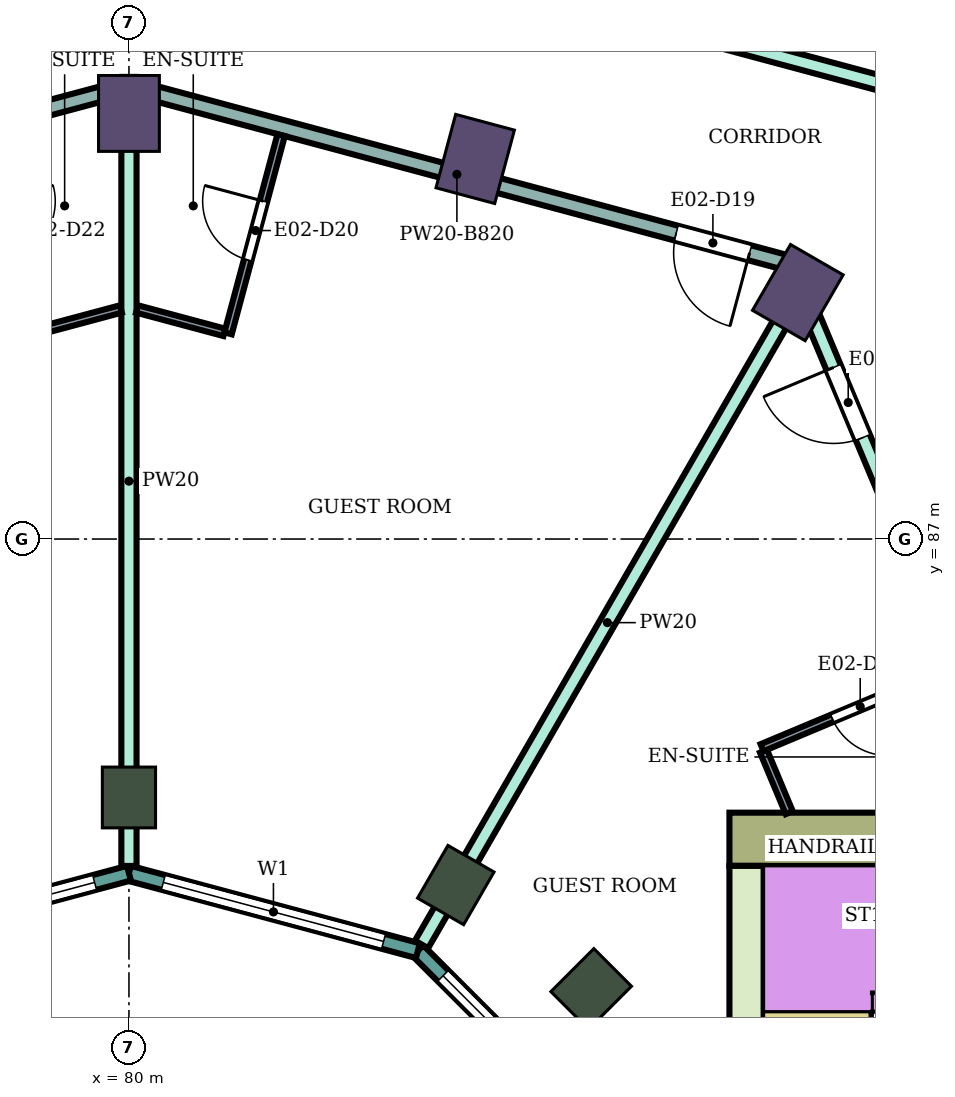
"""IFC4 building model, lengths in metres.
Left out: names, types, materials, properties, quantities, classifications, styles, units other than length and angle.
Written with IfcOpenShell. Run it as: python <this file> out.ifc"""

import sys

from ifc_helpers import new_model, si_unit, direction, frame, frame_2d, origin, origin_2d, place, context, subcontext, project, spatial, rectangle, extrude, element, fill, save


model = new_model("IFC4")
c1 = context("Model", 3, precision=1e-05, world=origin(), true_north=direction((0.0, 1.0)))
c2 = subcontext(c1, "Body", "Model", "MODEL_VIEW")
j1 = project(units=[si_unit("LENGTHUNIT", "METRE"), si_unit("PLANEANGLEUNIT", "RADIAN")], contexts=[c1])
p1 = place(None, origin())
s1 = spatial("IfcSite", under=j1, at=p1, CompositionType="ELEMENT")
p2 = place(p1, origin())
s2 = spatial("IfcBuilding", under=s1, at=p2, CompositionType="ELEMENT")
p3 = place(p2, frame((0.0, 0.0, 130.2)))
s3 = spatial("IfcBuildingStorey", under=s2, at=p3, CompositionType="ELEMENT", Elevation=130.2)
for number, where, z_axis, x_axis in (
    (1, (88.8, 90.242, 0.0), (0.0, 0.0, 1.0), (0.5, 0.866, 0.0)),
    (2, (84.555, 92.0, 0.0), (0.0, 0.0, 1.0), (0.259, 0.966, 0.0)),
    (3, (80.0, 92.6, 0.0), (0.0, 0.0, 1.0), (0.0, 1.0, 0.0)),
):
    element("IfcColumn", number, at=place(p3, frame(where, z_axis=z_axis, x_axis=x_axis)), inside=s3, PredefinedType="COLUMN", context=c2, shape_type="SweptSolid", body=[
        extrude(rectangle(XDim=1.0, YDim=0.8, at=origin_2d()), origin(), (0.0, 0.0, 1.0), 3.9),
    ])
for number, where, z_axis, x_axis in (
    (4, (86.081, 81.081, 0.0), (0.0, 0.0, 1.0), (0.707, 0.707, 0.0)),
    (5, (84.3, 82.448, 0.0), (0.0, 0.0, 1.0), (0.5, 0.866, 0.0)),
    (6, (80.0, 83.6, 0.0), (0.0, 0.0, 1.0), (0.0, 1.0, 0.0)),
):
    element("IfcColumn", number, at=place(p3, frame(where, z_axis=z_axis, x_axis=x_axis)), inside=s3, PredefinedType="COLUMN", context=c2, shape_type="SweptSolid", body=[
        extrude(rectangle(XDim=0.8, YDim=0.7, at=origin_2d()), origin(), (0.0, 0.0, 1.0), 3.9),
    ])
p4 = place(p3, frame((87.9, 83.05, 0.0), z_axis=(0.0, 0.0, 1.0), x_axis=(1.0, 0.0, 0.0)))
e7 = element("IfcWall", 7, at=p4, inside=s3, PredefinedType="SHEAR", context=c2, shape_type="SweptSolid", body=[
    extrude(rectangle(XDim=14.8, YDim=0.7, at=frame_2d((7.4, 0.0))), origin(), (0.0, 0.0, 1.0), 3.58),
])
p5 = place(p4, frame((4.2, 0.0, 0.0)))
e8 = element("IfcOpeningElement", 8, at=p5, cuts=e7, PredefinedType="OPENING", context=c2, shape_type="SweptSolid", body=[
    extrude(rectangle(XDim=2.4, YDim=2.4, at=frame_2d((1.2, 1.2))), frame((0.0, 0.36, 0.0), z_axis=(0.0, -1.0, 0.0), x_axis=(1.0, 0.0, 0.0)), (0.0, 0.0, 1.0), 0.72),
])
p6 = place(p3, frame((88.125, 75.0, 0.0), z_axis=(0.0, 0.0, 1.0), x_axis=(0.0, 1.0, 0.0)))
e9 = element("IfcWall", 9, at=p6, inside=s3, PredefinedType="SHEAR", context=c2, shape_type="SweptSolid", body=[
    extrude(rectangle(XDim=7.7, YDim=0.45, at=frame_2d((3.85, 0.0))), origin(), (0.0, 0.0, 1.0), 3.58),
])
p7 = place(p3, frame((86.585, 78.802, 0.0), z_axis=(0.0, 0.0, 1.0), x_axis=(-0.707106781187, 0.707106781187, 0.0)))
e10 = element("IfcWall", 10, at=p7, inside=s3, PredefinedType="NOTDEFINED", context=c2, shape_type="SweptSolid", body=[
    extrude(rectangle(XDim=3.936, YDim=0.2, at=frame_2d((1.968, 0.0))), origin(), (0.0, 0.0, 1.0), 3.9),
])
p8 = place(p7, frame((0.468, 0.0, 0.9)))
e11 = element("IfcOpeningElement", 11, at=p8, cuts=e10, PredefinedType="OPENING", context=c2, shape_type="SweptSolid", body=[
    extrude(rectangle(XDim=3.0, YDim=2.3, at=frame_2d((1.5, 1.15))), frame((0.0, 0.11, 0.0), z_axis=(0.0, -1.0, 0.0), x_axis=(1.0, 0.0, 0.0)), (0.0, 0.0, 1.0), 0.22),
])
p9 = place(p3, frame((83.802, 81.585, 0.0), z_axis=(0.0, 0.0, 1.0), x_axis=(-0.965933654434, 0.258789828301, 0.0)))
e12 = element("IfcWall", 12, at=p9, inside=s3, PredefinedType="NOTDEFINED", context=c2, shape_type="SweptSolid", body=[
    extrude(rectangle(XDim=3.936, YDim=0.2, at=frame_2d((1.968, 0.0))), origin(), (0.0, 0.0, 1.0), 3.9),
])
p10 = place(p9, frame((0.468, 0.0, 0.9)))
e13 = element("IfcOpeningElement", 13, at=p10, cuts=e12, PredefinedType="OPENING", context=c2, shape_type="SweptSolid", body=[
    extrude(rectangle(XDim=3.0, YDim=2.3, at=frame_2d((1.5, 1.15))), frame((0.0, 0.11, 0.0), z_axis=(0.0, -1.0, 0.0), x_axis=(1.0, 0.0, 0.0)), (0.0, 0.0, 1.0), 0.22),
])
p11 = place(p3, frame((80.0, 82.604, 0.0), z_axis=(0.0, 0.0, 1.0), x_axis=(-0.965933654434, -0.258789828301, 0.0)))
e14 = element("IfcWall", 14, at=p11, inside=s3, PredefinedType="NOTDEFINED", context=c2, shape_type="SweptSolid", body=[
    extrude(rectangle(XDim=3.936, YDim=0.2, at=frame_2d((1.968, 0.0))), origin(), (0.0, 0.0, 1.0), 3.9),
])
p12 = place(p11, frame((0.468, 0.0, 0.9)))
e15 = element("IfcOpeningElement", 15, at=p12, cuts=e14, PredefinedType="OPENING", context=c2, shape_type="SweptSolid", body=[
    extrude(rectangle(XDim=3.0, YDim=2.3, at=frame_2d((1.5, 1.15))), frame((0.0, 0.11, 0.0), z_axis=(0.0, -1.0, 0.0), x_axis=(1.0, 0.0, 0.0)), (0.0, 0.0, 1.0), 0.22),
])
p13 = place(p3, frame((69.397, 92.805, 0.0), z_axis=(0.0, 0.0, 1.0), x_axis=(0.965971666602, 0.258647906087, 0.0)))
e16 = element("IfcWall", 16, at=p13, inside=s3, PredefinedType="PARTITIONING", context=c2, shape_type="SweptSolid", body=[
    extrude(rectangle(XDim=10.887, YDim=0.2, at=frame_2d((5.443, 0.0))), origin(), (0.0, 0.0, 1.0), 3.45),
])
p14 = place(p13, frame((6.163, 0.0, 0.0)))
e17 = element("IfcOpeningElement", 17, at=p14, cuts=e16, PredefinedType="OPENING", context=c2, shape_type="SweptSolid", body=[
    extrude(rectangle(XDim=1.0, YDim=2.1, at=frame_2d((0.5, 1.05))), frame((0.0, 0.11, 0.0), z_axis=(0.0, -1.0, 0.0), x_axis=(1.0, 0.0, 0.0)), (0.0, 0.0, 1.0), 0.22),
])
p15 = place(p13, frame((2.461, 0.0, 0.0)))
e18 = element("IfcOpeningElement", 18, at=p15, cuts=e16, PredefinedType="OPENING", context=c2, shape_type="SweptSolid", body=[
    extrude(rectangle(XDim=1.0, YDim=2.1, at=frame_2d((0.5, 1.05))), frame((0.0, 0.11, 0.0), z_axis=(0.0, -1.0, 0.0), x_axis=(1.0, 0.0, 0.0)), (0.0, 0.0, 1.0), 0.22),
])
p16 = place(p3, frame((71.303, 90.625, 0.0), z_axis=(0.0, 0.0, 1.0), x_axis=(0.965971868307, 0.258647152776, 0.0)))
e19 = element("IfcWall", 19, at=p16, inside=s3, PredefinedType="PARTITIONING", context=c2, shape_type="SweptSolid", body=[
    extrude(rectangle(XDim=8.874, YDim=0.2, at=frame_2d((4.437, 0.0))), origin(), (0.0, 0.0, 1.0), 3.08),
])
p17 = place(p16, frame((0.55, 0.0, 0.0)))
e20 = element("IfcOpeningElement", 20, at=p17, cuts=e19, PredefinedType="OPENING", context=c2, shape_type="SweptSolid", body=[
    extrude(rectangle(XDim=1.0, YDim=2.1, at=frame_2d((0.5, 1.05))), frame((0.0, 0.11, 0.0), z_axis=(0.0, -1.0, 0.0), x_axis=(1.0, 0.0, 0.0)), (0.0, 0.0, 1.0), 0.22),
])
p18 = place(p3, frame((80.0, 82.699, 0.0), z_axis=(0.0, 0.0, 1.0), x_axis=(0.0, 1.0, 0.0)))
e21 = element("IfcWall", 21, at=p18, inside=s3, PredefinedType="PARTITIONING", context=c2, shape_type="SweptSolid", body=[
    extrude(rectangle(XDim=10.125, YDim=0.2, at=frame_2d((5.062, 0.0))), origin(), (0.0, 0.0, 1.0), 3.45),
])
p19 = place(p3, frame((80.0, 92.954, 0.0), z_axis=(0.0, 0.0, 1.0), x_axis=(0.96592536278, -0.258820774936, 0.0)))
e22 = element("IfcWall", 22, at=p19, inside=s3, PredefinedType="PARTITIONING", context=c2, shape_type="SweptSolid", body=[
    extrude(rectangle(XDim=8.934, YDim=0.2, at=frame_2d((4.467, 0.0))), origin(), (0.0, 0.0, 1.0), 3.08),
])
p20 = place(p19, frame((7.454, 0.0, 0.0)))
e23 = element("IfcOpeningElement", 23, at=p20, cuts=e22, PredefinedType="OPENING", context=c2, shape_type="SweptSolid", body=[
    extrude(rectangle(XDim=1.0, YDim=2.1, at=frame_2d((0.5, 1.05))), frame((0.0, 0.11, 0.0), z_axis=(0.0, -1.0, 0.0), x_axis=(1.0, 0.0, 0.0)), (0.0, 0.0, 1.0), 0.22),
])
p21 = place(p3, frame((80.0, 95.648, 0.0), z_axis=(0.0, 0.0, 1.0), x_axis=(0.965852259202, -0.259093445292, 0.0)))
e24 = element("IfcWall", 24, at=p21, inside=s3, PredefinedType="PARTITIONING", context=c2, shape_type="SweptSolid", body=[
    extrude(rectangle(XDim=10.597, YDim=0.2, at=frame_2d((5.298, 0.0))), origin(), (0.0, 0.0, 1.0), 3.45),
])
p22 = place(p21, frame((1.0, 0.0, 0.0)))
e25 = element("IfcOpeningElement", 25, at=p22, cuts=e24, PredefinedType="OPENING", context=c2, shape_type="SweptSolid", body=[
    extrude(rectangle(XDim=1.0, YDim=2.1, at=frame_2d((0.5, 1.05))), frame((0.0, 0.11, 0.0), z_axis=(0.0, -1.0, 0.0), x_axis=(1.0, 0.0, 0.0)), (0.0, 0.0, 1.0), 0.22),
])
p23 = place(p3, frame((83.85, 81.667, 0.0), z_axis=(0.0, 0.0, 1.0), x_axis=(0.500092047414, 0.865972253663, 0.0)))
e26 = element("IfcWall", 26, at=p23, inside=s3, PredefinedType="PARTITIONING", context=c2, shape_type="SweptSolid", body=[
    extrude(rectangle(XDim=9.778, YDim=0.2, at=frame_2d((4.889, 0.0))), origin(), (0.0, 0.0, 1.0), 3.45),
])
p24 = place(p3, frame((88.698, 90.624, 0.0), z_axis=(0.0, 0.0, 1.0), x_axis=(0.386027055918, -0.922487459047, 0.0)))
e27 = element("IfcWall", 27, at=p24, inside=s3, PredefinedType="PARTITIONING", context=c2, shape_type="SweptSolid", body=[
    extrude(rectangle(XDim=7.832, YDim=0.2, at=frame_2d((3.916, 0.0))), origin(), (0.0, 0.0, 1.0), 3.45),
])
p25 = place(p24, frame((1.482, 0.0, 0.0)))
e28 = element("IfcOpeningElement", 28, at=p25, cuts=e27, PredefinedType="OPENING", context=c2, shape_type="SweptSolid", body=[
    extrude(rectangle(XDim=1.0, YDim=2.1, at=frame_2d((0.5, 1.05))), frame((0.0, 0.11, 0.0), z_axis=(0.0, -1.0, 0.0), x_axis=(1.0, 0.0, 0.0)), (0.0, 0.0, 1.0), 0.22),
])
p26 = place(p3, frame((78.696, 89.706, 0.0), z_axis=(0.0, 0.0, 1.0), x_axis=(0.966002513606, 0.258532674351, 0.0)))
e29 = element("IfcWall", 29, at=p26, inside=s3, PredefinedType="PARTITIONING", context=c2, shape_type="SweptSolid", body=[
    extrude(rectangle(XDim=1.24, YDim=0.1, at=frame_2d((0.62, 0.0))), origin(), (0.0, 0.0, 1.0), 3.45),
])
p27 = place(p3, frame((80.106, 90.027, 0.0), z_axis=(0.0, 0.0, 1.0), x_axis=(0.966002973184, -0.258530957139, 0.0)))
e30 = element("IfcWall", 30, at=p27, inside=s3, PredefinedType="PARTITIONING", context=c2, shape_type="SweptSolid", body=[
    extrude(rectangle(XDim=1.19, YDim=0.1, at=frame_2d((0.595, 0.0))), origin(), (0.0, 0.0, 1.0), 3.45),
])
p28 = place(p3, frame((81.304, 89.706, 0.0), z_axis=(0.0, 0.0, 1.0), x_axis=(0.258608022684, 0.965982344872, 0.0)))
e31 = element("IfcWall", 31, at=p28, inside=s3, PredefinedType="PARTITIONING", context=c2, shape_type="SweptSolid", body=[
    extrude(rectangle(XDim=2.7, YDim=0.1, at=frame_2d((1.35, 0.0))), origin(), (0.0, 0.0, 1.0), 3.45),
])
p29 = place(p28, frame((1.0, 0.0, 0.0)))
e32 = element("IfcOpeningElement", 32, at=p29, cuts=e31, PredefinedType="OPENING", context=c2, shape_type="SweptSolid", body=[
    extrude(rectangle(XDim=0.8, YDim=2.1, at=frame_2d((0.4, 1.05))), frame((0.0, 0.06, 0.0), z_axis=(0.0, -1.0, 0.0), x_axis=(1.0, 0.0, 0.0)), (0.0, 0.0, 1.0), 0.12),
])
p30 = place(p3, frame((88.348, 84.209, 0.0), z_axis=(0.0, 0.0, 1.0), x_axis=(0.386077497504, -0.922466349479, 0.0)))
e33 = element("IfcWall", 33, at=p30, inside=s3, PredefinedType="PARTITIONING", context=c2, shape_type="SweptSolid", body=[
    extrude(rectangle(XDim=0.877, YDim=0.1, at=frame_2d((0.438, 0.0))), origin(), (0.0, 0.0, 1.0), 3.45),
])
p31 = place(p3, frame((88.329, 84.255, 0.0), z_axis=(0.0, 0.0, 1.0), x_axis=(0.922320663728, 0.386425404522, 0.0)))
e34 = element("IfcWall", 34, at=p31, inside=s3, PredefinedType="PARTITIONING", context=c2, shape_type="SweptSolid", body=[
    extrude(rectangle(XDim=2.69, YDim=0.1, at=frame_2d((1.345, 0.0))), origin(), (0.0, 0.0, 1.0), 3.45),
])
p32 = place(p31, frame((1.0, 0.0, 0.0)))
e35 = element("IfcOpeningElement", 35, at=p32, cuts=e34, PredefinedType="OPENING", context=c2, shape_type="SweptSolid", body=[
    extrude(rectangle(XDim=0.8, YDim=2.1, at=frame_2d((0.4, 1.05))), frame((0.0, 0.06, 0.0), z_axis=(0.0, -1.0, 0.0), x_axis=(1.0, 0.0, 0.0)), (0.0, 0.0, 1.0), 0.12),
])
p33 = place(p8, origin())
e36 = element("IfcWindow", 36, at=p33, inside=s3, PartitioningType="SINGLE_PANEL", PredefinedType="WINDOW", context=c2, shape_type="SweptSolid", body=[
    extrude(rectangle(XDim=3.0, YDim=2.3, at=frame_2d((1.5, 1.15))), frame((0.0, 0.03, 0.0), z_axis=(0.0, -1.0, 0.0), x_axis=(1.0, 0.0, 0.0)), (0.0, 0.0, 1.0), 0.06),
])
fill(e11, e36)
p34 = place(p10, origin())
e37 = element("IfcWindow", 37, at=p34, inside=s3, PartitioningType="SINGLE_PANEL", PredefinedType="WINDOW", context=c2, shape_type="SweptSolid", body=[
    extrude(rectangle(XDim=3.0, YDim=2.3, at=frame_2d((1.5, 1.15))), frame((0.0, 0.03, 0.0), z_axis=(0.0, -1.0, 0.0), x_axis=(1.0, 0.0, 0.0)), (0.0, 0.0, 1.0), 0.06),
])
fill(e13, e37)
p35 = place(p12, origin())
e38 = element("IfcWindow", 38, at=p35, inside=s3, PartitioningType="SINGLE_PANEL", PredefinedType="WINDOW", context=c2, shape_type="SweptSolid", body=[
    extrude(rectangle(XDim=3.0, YDim=2.3, at=frame_2d((1.5, 1.15))), frame((0.0, 0.03, 0.0), z_axis=(0.0, -1.0, 0.0), x_axis=(1.0, 0.0, 0.0)), (0.0, 0.0, 1.0), 0.06),
])
fill(e15, e38)
p36 = place(p25, frame((1.0, 0.0, 0.0), z_axis=(0.0, 0.0, 1.0), x_axis=(-1.0, 0.0, 0.0)))
e39 = element("IfcDoor", 39, at=p36, inside=s3, OperationType="SINGLE_SWING_RIGHT", PredefinedType="DOOR", context=c2, shape_type="SweptSolid", body=[
    extrude(rectangle(XDim=1.0, YDim=2.1, at=frame_2d((0.5, 1.05))), frame((0.0, 0.025, 0.0), z_axis=(0.0, -1.0, 0.0), x_axis=(1.0, 0.0, 0.0)), (0.0, 0.0, 1.0), 0.05),
])
fill(e28, e39)
p37 = place(p32, frame((0.8, 0.0, 0.0), z_axis=(0.0, 0.0, 1.0), x_axis=(-1.0, 0.0, 0.0)))
e40 = element("IfcDoor", 40, at=p37, inside=s3, OperationType="SINGLE_SWING_LEFT", PredefinedType="DOOR", context=c2, shape_type="SweptSolid", body=[
    extrude(rectangle(XDim=0.8, YDim=2.1, at=frame_2d((0.4, 1.05))), frame((0.0, 0.025, 0.0), z_axis=(0.0, -1.0, 0.0), x_axis=(1.0, 0.0, 0.0)), (0.0, 0.0, 1.0), 0.05),
])
fill(e35, e40)
p38 = place(p20, frame((1.0, 0.0, 0.0), z_axis=(0.0, 0.0, 1.0), x_axis=(-1.0, 0.0, 0.0)))
e41 = element("IfcDoor", 41, at=p38, inside=s3, OperationType="SINGLE_SWING_LEFT", PredefinedType="DOOR", context=c2, shape_type="SweptSolid", body=[
    extrude(rectangle(XDim=1.0, YDim=2.1, at=frame_2d((0.5, 1.05))), frame((0.0, 0.025, 0.0), z_axis=(0.0, -1.0, 0.0), x_axis=(1.0, 0.0, 0.0)), (0.0, 0.0, 1.0), 0.05),
])
fill(e23, e41)
p39 = place(p29, origin())
e42 = element("IfcDoor", 42, at=p39, inside=s3, OperationType="SINGLE_SWING_RIGHT", PredefinedType="DOOR", context=c2, shape_type="SweptSolid", body=[
    extrude(rectangle(XDim=0.8, YDim=2.1, at=frame_2d((0.4, 1.05))), frame((0.0, 0.025, 0.0), z_axis=(0.0, -1.0, 0.0), x_axis=(1.0, 0.0, 0.0)), (0.0, 0.0, 1.0), 0.05),
])
fill(e32, e42)
save(model, sys.argv[1])
